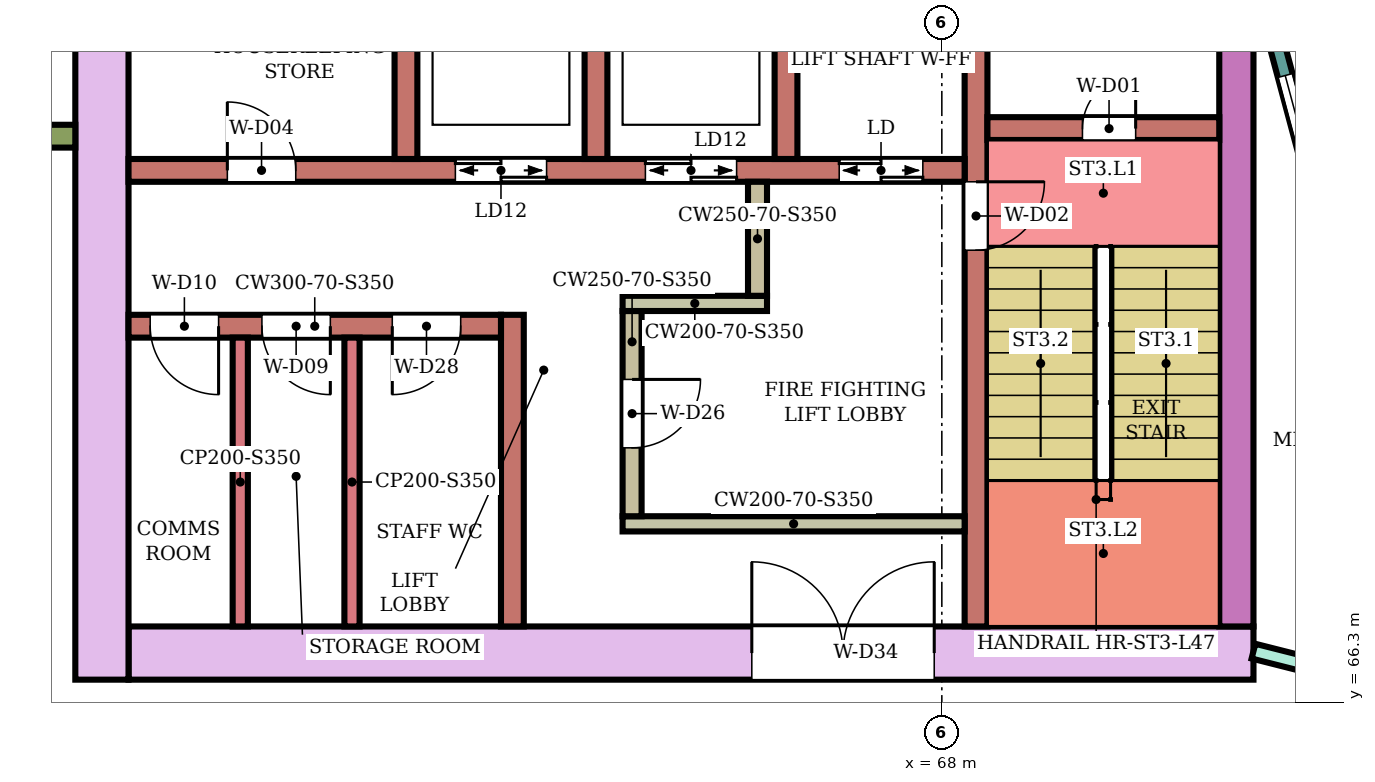
"""IFC4 building model, lengths in metres.
Left out: names, types, materials, properties, quantities, classifications, styles, units other than length and angle.
Written with IfcOpenShell. Run it as: python <this file> out.ifc"""

import sys

from ifc_helpers import new_model, si_unit, direction, frame, frame_2d, origin, place, context, subcontext, project, spatial, rectangle, extrude, element, fill, save


model = new_model("IFC4")
c1 = context("Model", 3, precision=1e-05, world=origin(), true_north=direction((0.0, 1.0)))
c2 = subcontext(c1, "Body", "Model", "MODEL_VIEW")
j1 = project(units=[si_unit("LENGTHUNIT", "METRE"), si_unit("PLANEANGLEUNIT", "RADIAN")], contexts=[c1])
p1 = place(None, origin())
s1 = spatial("IfcSite", under=j1, at=p1, CompositionType="ELEMENT")
p2 = place(p1, origin())
s2 = spatial("IfcBuilding", under=s1, at=p2, CompositionType="ELEMENT")
p3 = place(p2, frame((0.0, 0.0, 202.8)))
s3 = spatial("IfcBuildingStorey", under=s2, at=p3, CompositionType="ELEMENT", Elevation=202.8)
p4 = place(p3, frame((72.1, 66.95, 0.0), z_axis=(0.0, 0.0, 1.0), x_axis=(-1.0, 0.0, 0.0)))
e1 = element("IfcWall", 1, at=p4, inside=s3, PredefinedType="SHEAR", context=c2, shape_type="SweptSolid", body=[
    extrude(rectangle(XDim=14.8, YDim=0.7, at=frame_2d((7.4, 0.0))), origin(), (0.0, 0.0, 1.0), 3.75),
])
p5 = place(p4, frame((4.2, 0.0, 0.0)))
e2 = element("IfcOpeningElement", 2, at=p5, cuts=e1, PredefinedType="OPENING", context=c2, shape_type="SweptSolid", body=[
    extrude(rectangle(XDim=2.4, YDim=2.4, at=frame_2d((1.2, 1.2))), frame((0.0, 0.36, 0.0), z_axis=(0.0, -1.0, 0.0), x_axis=(1.0, 0.0, 0.0)), (0.0, 0.0, 1.0), 0.72),
])
p6 = place(p3, frame((71.875, 75.0, 0.0), z_axis=(0.0, 0.0, 1.0), x_axis=(0.0, -1.0, 0.0)))
e3 = element("IfcWall", 3, at=p6, inside=s3, PredefinedType="SHEAR", context=c2, shape_type="SweptSolid", body=[
    extrude(rectangle(XDim=7.7, YDim=0.45, at=frame_2d((3.85, 0.0))), origin(), (0.0, 0.0, 1.0), 3.75),
])
p7 = place(p3, frame((56.95, 83.4, 0.0), z_axis=(0.0, 0.0, 1.0), x_axis=(0.0, -1.0, 0.0)))
e4 = element("IfcWall", 4, at=p7, inside=s3, PredefinedType="SHEAR", context=c2, shape_type="SweptSolid", body=[
    extrude(rectangle(XDim=16.8, YDim=0.7, at=frame_2d((8.4, 0.0))), origin(), (0.0, 0.0, 1.0), 3.75),
])
p8 = place(p3, frame((68.45, 75.0, 0.0), z_axis=(0.0, 0.0, 1.0), x_axis=(0.0, -1.0, 0.0)))
e5 = element("IfcWall", 5, at=p8, inside=s3, PredefinedType="SHEAR", context=c2, shape_type="SweptSolid", body=[
    extrude(rectangle(XDim=7.7, YDim=0.3, at=frame_2d((3.85, 0.0))), origin(), (0.0, 0.0, 1.0), 3.75),
])
p9 = place(p8, frame((1.85, 0.0, 0.0)))
e6 = element("IfcOpeningElement", 6, at=p9, cuts=e5, PredefinedType="OPENING", context=c2, shape_type="SweptSolid", body=[
    extrude(rectangle(XDim=0.9, YDim=2.1, at=frame_2d((0.45, 1.05))), frame((0.0, 0.16, 0.0), z_axis=(0.0, -1.0, 0.0), x_axis=(1.0, 0.0, 0.0)), (0.0, 0.0, 1.0), 0.32),
])
p10 = place(p3, frame((71.65, 73.85, 0.0), z_axis=(0.0, 0.0, 1.0), x_axis=(-1.0, 0.0, 0.0)))
e7 = element("IfcWall", 7, at=p10, inside=s3, PredefinedType="SHEAR", context=c2, shape_type="SweptSolid", body=[
    extrude(rectangle(XDim=3.05, YDim=0.3, at=frame_2d((1.525, 0.0))), origin(), (0.0, 0.0, 1.0), 3.75),
])
p11 = place(p10, frame((1.1, 0.0, 0.0)))
e8 = element("IfcOpeningElement", 8, at=p11, cuts=e7, PredefinedType="OPENING", context=c2, shape_type="SweptSolid", body=[
    extrude(rectangle(XDim=0.7, YDim=2.0, at=frame_2d((0.35, 1.0))), frame((0.0, 0.16, 0.0), z_axis=(0.0, -1.0, 0.0), x_axis=(1.0, 0.0, 0.0)), (0.0, 0.0, 1.0), 0.32),
])
p12 = place(p3, frame((68.3, 73.3, 0.0), z_axis=(0.0, 0.0, 1.0), x_axis=(-1.0, 0.0, 0.0)))
e9 = element("IfcWall", 9, at=p12, inside=s3, PredefinedType="SHEAR", context=c2, shape_type="SweptSolid", body=[
    extrude(rectangle(XDim=11.0, YDim=0.3, at=frame_2d((5.5, 0.0))), origin(), (0.0, 0.0, 1.0), 3.75),
])
p13 = place(p12, frame((0.55, 0.0, 0.0)))
e10 = element("IfcOpeningElement", 10, at=p13, cuts=e9, PredefinedType="OPENING", context=c2, shape_type="SweptSolid", body=[
    extrude(rectangle(XDim=1.1, YDim=2.1, at=frame_2d((0.55, 1.05))), frame((0.0, 0.16, 0.0), z_axis=(0.0, -1.0, 0.0), x_axis=(1.0, 0.0, 0.0)), (0.0, 0.0, 1.0), 0.32),
])
p14 = place(p12, frame((3.0, 0.0, 0.0)))
e11 = element("IfcOpeningElement", 11, at=p14, cuts=e9, PredefinedType="OPENING", context=c2, shape_type="SweptSolid", body=[
    extrude(rectangle(XDim=1.2, YDim=2.1, at=frame_2d((0.6, 1.05))), frame((0.0, 0.16, 0.0), z_axis=(0.0, -1.0, 0.0), x_axis=(1.0, 0.0, 0.0)), (0.0, 0.0, 1.0), 0.32),
])
p15 = place(p12, frame((5.5, 0.0, 0.0)))
e12 = element("IfcOpeningElement", 12, at=p15, cuts=e9, PredefinedType="OPENING", context=c2, shape_type="SweptSolid", body=[
    extrude(rectangle(XDim=1.2, YDim=2.1, at=frame_2d((0.6, 1.05))), frame((0.0, 0.16, 0.0), z_axis=(0.0, -1.0, 0.0), x_axis=(1.0, 0.0, 0.0)), (0.0, 0.0, 1.0), 0.32),
])
p16 = place(p12, frame((8.8, 0.0, 0.0)))
e13 = element("IfcOpeningElement", 13, at=p16, cuts=e9, PredefinedType="OPENING", context=c2, shape_type="SweptSolid", body=[
    extrude(rectangle(XDim=0.9, YDim=2.1, at=frame_2d((0.45, 1.05))), frame((0.0, 0.16, 0.0), z_axis=(0.0, -1.0, 0.0), x_axis=(1.0, 0.0, 0.0)), (0.0, 0.0, 1.0), 0.32),
])
for number, where, z_axis, x_axis in (
    (14, (65.95, 76.0, 0.0), (0.0, 0.0, 1.0), (0.0, -1.0, 0.0)),
    (15, (63.45, 76.0, 0.0), (0.0, 0.0, 1.0), (0.0, -1.0, 0.0)),
    (16, (60.95, 76.0, 0.0), (0.0, 0.0, 1.0), (0.0, -1.0, 0.0)),
):
    element("IfcWall", number, at=place(p3, frame(where, z_axis=z_axis, x_axis=x_axis)), inside=s3, PredefinedType="SHEAR", context=c2, shape_type="SweptSolid", body=[
        extrude(rectangle(XDim=2.55, YDim=0.3, at=frame_2d((1.275, 0.0))), origin(), (0.0, 0.0, 1.0), 3.75),
    ])
p17 = place(p3, frame((68.3, 68.65, 0.0), z_axis=(0.0, 0.0, 1.0), x_axis=(-1.0, 0.0, 0.0)))
e17 = element("IfcWall", 17, at=p17, inside=s3, PredefinedType="SHEAR", context=c2, shape_type="SweptSolid", body=[
    extrude(rectangle(XDim=4.5, YDim=0.2, at=frame_2d((2.25, 0.0))), origin(), (0.0, 0.0, 1.0), 3.75),
])
p18 = place(p3, frame((63.925, 71.45, 0.0), z_axis=(0.0, 0.0, 1.0), x_axis=(0.0, -1.0, 0.0)))
e18 = element("IfcWall", 18, at=p18, inside=s3, PredefinedType="SHEAR", context=c2, shape_type="SweptSolid", body=[
    extrude(rectangle(XDim=2.7, YDim=0.25, at=frame_2d((1.35, 0.0))), origin(), (0.0, 0.0, 1.0), 3.75),
])
p19 = place(p18, frame((0.9, 0.0, 0.0)))
e19 = element("IfcOpeningElement", 19, at=p19, cuts=e18, PredefinedType="OPENING", context=c2, shape_type="SweptSolid", body=[
    extrude(rectangle(XDim=0.9, YDim=2.1, at=frame_2d((0.45, 1.05))), frame((0.0, 0.135, 0.0), z_axis=(0.0, -1.0, 0.0), x_axis=(1.0, 0.0, 0.0)), (0.0, 0.0, 1.0), 0.27),
])
p20 = place(p3, frame((65.7, 71.55, 0.0), z_axis=(0.0, 0.0, 1.0), x_axis=(-1.0, 0.0, 0.0)))
e20 = element("IfcWall", 20, at=p20, inside=s3, PredefinedType="SHEAR", context=c2, shape_type="SweptSolid", body=[
    extrude(rectangle(XDim=1.9, YDim=0.2, at=frame_2d((0.95, 0.0))), origin(), (0.0, 0.0, 1.0), 3.75),
])
p21 = place(p3, frame((65.575, 73.15, 0.0), z_axis=(0.0, 0.0, 1.0), x_axis=(0.0, -1.0, 0.0)))
e21 = element("IfcWall", 21, at=p21, inside=s3, PredefinedType="SHEAR", context=c2, shape_type="SweptSolid", body=[
    extrude(rectangle(XDim=1.5, YDim=0.25, at=frame_2d((0.75, 0.0))), origin(), (0.0, 0.0, 1.0), 3.75),
])
p22 = place(p3, frame((62.35, 71.4, 0.0), z_axis=(0.0, 0.0, 1.0), x_axis=(0.0, -1.0, 0.0)))
e22 = element("IfcWall", 22, at=p22, inside=s3, PredefinedType="SHEAR", context=c2, shape_type="SweptSolid", body=[
    extrude(rectangle(XDim=4.1, YDim=0.3, at=frame_2d((2.05, 0.0))), origin(), (0.0, 0.0, 1.0), 3.75),
])
p23 = place(p3, frame((62.2, 71.25, 0.0), z_axis=(0.0, 0.0, 1.0), x_axis=(-1.0, 0.0, 0.0)))
e23 = element("IfcWall", 23, at=p23, inside=s3, PredefinedType="SHEAR", context=c2, shape_type="SweptSolid", body=[
    extrude(rectangle(XDim=4.9, YDim=0.3, at=frame_2d((2.45, 0.0))), origin(), (0.0, 0.0, 1.0), 3.75),
])
p24 = place(p23, frame((0.53, 0.0, 0.0)))
e24 = element("IfcOpeningElement", 24, at=p24, cuts=e23, PredefinedType="OPENING", context=c2, shape_type="SweptSolid", body=[
    extrude(rectangle(XDim=0.9, YDim=2.1, at=frame_2d((0.45, 1.05))), frame((0.0, 0.16, 0.0), z_axis=(0.0, -1.0, 0.0), x_axis=(1.0, 0.0, 0.0)), (0.0, 0.0, 1.0), 0.32),
])
p25 = place(p23, frame((2.245, 0.0, 0.0)))
e25 = element("IfcOpeningElement", 25, at=p25, cuts=e23, PredefinedType="OPENING", context=c2, shape_type="SweptSolid", body=[
    extrude(rectangle(XDim=0.9, YDim=2.1, at=frame_2d((0.45, 1.05))), frame((0.0, 0.16, 0.0), z_axis=(0.0, -1.0, 0.0), x_axis=(1.0, 0.0, 0.0)), (0.0, 0.0, 1.0), 0.32),
])
p26 = place(p23, frame((3.715, 0.0, 0.0)))
e26 = element("IfcOpeningElement", 26, at=p26, cuts=e23, PredefinedType="OPENING", context=c2, shape_type="SweptSolid", body=[
    extrude(rectangle(XDim=0.9, YDim=2.1, at=frame_2d((0.45, 1.05))), frame((0.0, 0.16, 0.0), z_axis=(0.0, -1.0, 0.0), x_axis=(1.0, 0.0, 0.0)), (0.0, 0.0, 1.0), 0.32),
])
p27 = place(p3, frame((56.6, 73.75, 0.0), z_axis=(0.0, 0.0, 1.0), x_axis=(-1.0, 0.0, 0.0)))
e27 = element("IfcWall", 27, at=p27, inside=s3, PredefinedType="NOTDEFINED", context=c2, shape_type="SweptSolid", body=[
    extrude(rectangle(XDim=2.416, YDim=0.3, at=frame_2d((1.208, 0.0))), origin(), (0.0, 0.0, 1.0), 4.1),
])
p28 = place(p3, frame((72.396, 75.0, 0.0), z_axis=(0.0, 0.0, 1.0), x_axis=(0.258789828301, -0.965933654434, 0.0)))
e28 = element("IfcWall", 28, at=p28, inside=s3, PredefinedType="NOTDEFINED", context=c2, shape_type="SweptSolid", body=[
    extrude(rectangle(XDim=3.936, YDim=0.2, at=frame_2d((1.968, 0.0))), origin(), (0.0, 0.0, 1.0), 4.1),
])
p29 = place(p28, frame((0.468, 0.0, 0.9)))
e29 = element("IfcOpeningElement", 29, at=p29, cuts=e28, PredefinedType="OPENING", context=c2, shape_type="SweptSolid", body=[
    extrude(rectangle(XDim=3.0, YDim=2.3, at=frame_2d((1.5, 1.15))), frame((0.0, 0.11, 0.0), z_axis=(0.0, -1.0, 0.0), x_axis=(1.0, 0.0, 0.0)), (0.0, 0.0, 1.0), 0.22),
])
p30 = place(p3, frame((72.1, 66.975, 0.0), z_axis=(0.0, 0.0, 1.0), x_axis=(0.969471314457, -0.245204752086, 0.0)))
e30 = element("IfcWall", 30, at=p30, inside=s3, PredefinedType="PARTITIONING", context=c2, shape_type="SweptSolid", body=[
    extrude(rectangle(XDim=2.582, YDim=0.2, at=frame_2d((1.291, 0.0))), origin(), (0.0, 0.0, 1.0), 3.65),
])
p31 = place(p30, frame((0.841, 0.0, 0.0)))
e31 = element("IfcOpeningElement", 31, at=p31, cuts=e30, PredefinedType="OPENING", context=c2, shape_type="SweptSolid", body=[
    extrude(rectangle(XDim=0.9, YDim=2.1, at=frame_2d((0.45, 1.05))), frame((0.0, 0.11, 0.0), z_axis=(0.0, -1.0, 0.0), x_axis=(1.0, 0.0, 0.0)), (0.0, 0.0, 1.0), 0.22),
])
for number, where, z_axis, x_axis in (
    (32, (60.24, 71.1, 0.0), (0.0, 0.0, 1.0), (0.0, -1.0, 0.0)),
    (33, (58.77, 71.1, 0.0), (0.0, 0.0, 1.0), (0.0, -1.0, 0.0)),
):
    element("IfcWall", number, at=place(p3, frame(where, z_axis=z_axis, x_axis=x_axis)), inside=s3, PredefinedType="PARTITIONING", context=c2, shape_type="SweptSolid", body=[
        extrude(rectangle(XDim=3.8, YDim=0.2, at=frame_2d((1.9, 0.0))), origin(), (0.0, 0.0, 1.0), 3.75),
    ])
p32 = place(p29, origin())
e34 = element("IfcWindow", 34, at=p32, inside=s3, PartitioningType="SINGLE_PANEL", PredefinedType="WINDOW", context=c2, shape_type="SweptSolid", body=[
    extrude(rectangle(XDim=3.0, YDim=2.3, at=frame_2d((1.5, 1.15))), frame((0.0, 0.03, 0.0), z_axis=(0.0, -1.0, 0.0), x_axis=(1.0, 0.0, 0.0)), (0.0, 0.0, 1.0), 0.06),
])
fill(e29, e34)
p33 = place(p11, frame((0.7, 0.0, 0.0), z_axis=(0.0, 0.0, 1.0), x_axis=(-1.0, 0.0, 0.0)))
e35 = element("IfcDoor", 35, at=p33, inside=s3, OperationType="SINGLE_SWING_RIGHT", PredefinedType="DOOR", context=c2, shape_type="SweptSolid", body=[
    extrude(rectangle(XDim=0.7, YDim=2.0, at=frame_2d((0.35, 1.0))), frame((0.0, 0.025, 0.0), z_axis=(0.0, -1.0, 0.0), x_axis=(1.0, 0.0, 0.0)), (0.0, 0.0, 1.0), 0.05),
])
fill(e8, e35)
p34 = place(p9, origin())
e36 = element("IfcDoor", 36, at=p34, inside=s3, OperationType="SINGLE_SWING_LEFT", PredefinedType="DOOR", context=c2, shape_type="SweptSolid", body=[
    extrude(rectangle(XDim=0.9, YDim=2.1, at=frame_2d((0.45, 1.05))), frame((0.0, 0.025, 0.0), z_axis=(0.0, -1.0, 0.0), x_axis=(1.0, 0.0, 0.0)), (0.0, 0.0, 1.0), 0.05),
])
fill(e6, e36)
p35 = place(p13, origin())
e37 = element("IfcDoor", 37, at=p35, inside=s3, OperationType="DOUBLE_DOOR_SLIDING", PredefinedType="DOOR", context=c2, shape_type="SweptSolid", body=[
    extrude(rectangle(XDim=1.1, YDim=2.1, at=frame_2d((0.55, 1.05))), frame((0.0, 0.025, 0.0), z_axis=(0.0, -1.0, 0.0), x_axis=(1.0, 0.0, 0.0)), (0.0, 0.0, 1.0), 0.05),
])
fill(e10, e37)
p36 = place(p14, origin())
e38 = element("IfcDoor", 38, at=p36, inside=s3, OperationType="DOUBLE_DOOR_SLIDING", PredefinedType="DOOR", context=c2, shape_type="SweptSolid", body=[
    extrude(rectangle(XDim=1.2, YDim=2.1, at=frame_2d((0.6, 1.05))), frame((0.0, 0.025, 0.0), z_axis=(0.0, -1.0, 0.0), x_axis=(1.0, 0.0, 0.0)), (0.0, 0.0, 1.0), 0.05),
])
fill(e11, e38)
p37 = place(p15, origin())
e39 = element("IfcDoor", 39, at=p37, inside=s3, OperationType="DOUBLE_DOOR_SLIDING", PredefinedType="DOOR", context=c2, shape_type="SweptSolid", body=[
    extrude(rectangle(XDim=1.2, YDim=2.1, at=frame_2d((0.6, 1.05))), frame((0.0, 0.025, 0.0), z_axis=(0.0, -1.0, 0.0), x_axis=(1.0, 0.0, 0.0)), (0.0, 0.0, 1.0), 0.05),
])
fill(e12, e39)
p38 = place(p16, frame((0.9, 0.0, 0.0), z_axis=(0.0, 0.0, 1.0), x_axis=(-1.0, 0.0, 0.0)))
e40 = element("IfcDoor", 40, at=p38, inside=s3, OperationType="SINGLE_SWING_LEFT", PredefinedType="DOOR", context=c2, shape_type="SweptSolid", body=[
    extrude(rectangle(XDim=0.9, YDim=2.1, at=frame_2d((0.45, 1.05))), frame((0.0, 0.025, 0.0), z_axis=(0.0, -1.0, 0.0), x_axis=(1.0, 0.0, 0.0)), (0.0, 0.0, 1.0), 0.05),
])
fill(e13, e40)
p39 = place(p19, origin())
e41 = element("IfcDoor", 41, at=p39, inside=s3, OperationType="SINGLE_SWING_LEFT", PredefinedType="DOOR", context=c2, shape_type="SweptSolid", body=[
    extrude(rectangle(XDim=0.9, YDim=2.1, at=frame_2d((0.45, 1.05))), frame((0.0, 0.025, 0.0), z_axis=(0.0, -1.0, 0.0), x_axis=(1.0, 0.0, 0.0)), (0.0, 0.0, 1.0), 0.05),
])
fill(e19, e41)
p40 = place(p24, origin())
e42 = element("IfcDoor", 42, at=p40, inside=s3, OperationType="SINGLE_SWING_RIGHT", PredefinedType="DOOR", context=c2, shape_type="SweptSolid", body=[
    extrude(rectangle(XDim=0.9, YDim=2.1, at=frame_2d((0.45, 1.05))), frame((0.0, 0.025, 0.0), z_axis=(0.0, -1.0, 0.0), x_axis=(1.0, 0.0, 0.0)), (0.0, 0.0, 1.0), 0.05),
])
fill(e24, e42)
p41 = place(p25, origin())
e43 = element("IfcDoor", 43, at=p41, inside=s3, OperationType="SINGLE_SWING_LEFT", PredefinedType="DOOR", context=c2, shape_type="SweptSolid", body=[
    extrude(rectangle(XDim=0.9, YDim=2.1, at=frame_2d((0.45, 1.05))), frame((0.0, 0.025, 0.0), z_axis=(0.0, -1.0, 0.0), x_axis=(1.0, 0.0, 0.0)), (0.0, 0.0, 1.0), 0.05),
])
fill(e25, e43)
p42 = place(p26, origin())
e44 = element("IfcDoor", 44, at=p42, inside=s3, OperationType="SINGLE_SWING_LEFT", PredefinedType="DOOR", context=c2, shape_type="SweptSolid", body=[
    extrude(rectangle(XDim=0.9, YDim=2.1, at=frame_2d((0.45, 1.05))), frame((0.0, 0.025, 0.0), z_axis=(0.0, -1.0, 0.0), x_axis=(1.0, 0.0, 0.0)), (0.0, 0.0, 1.0), 0.05),
])
fill(e26, e44)
p43 = place(p5, frame((2.4, 0.0, 0.0), z_axis=(0.0, 0.0, 1.0), x_axis=(-1.0, 0.0, 0.0)))
e45 = element("IfcDoor", 45, at=p43, inside=s3, OperationType="DOUBLE_DOOR_SINGLE_SWING", PredefinedType="DOOR", context=c2, shape_type="SweptSolid", body=[
    extrude(rectangle(XDim=2.4, YDim=2.4, at=frame_2d((1.2, 1.2))), frame((0.0, 0.025, 0.0), z_axis=(0.0, -1.0, 0.0), x_axis=(1.0, 0.0, 0.0)), (0.0, 0.0, 1.0), 0.05),
])
fill(e2, e45)
save(model, sys.argv[1])
